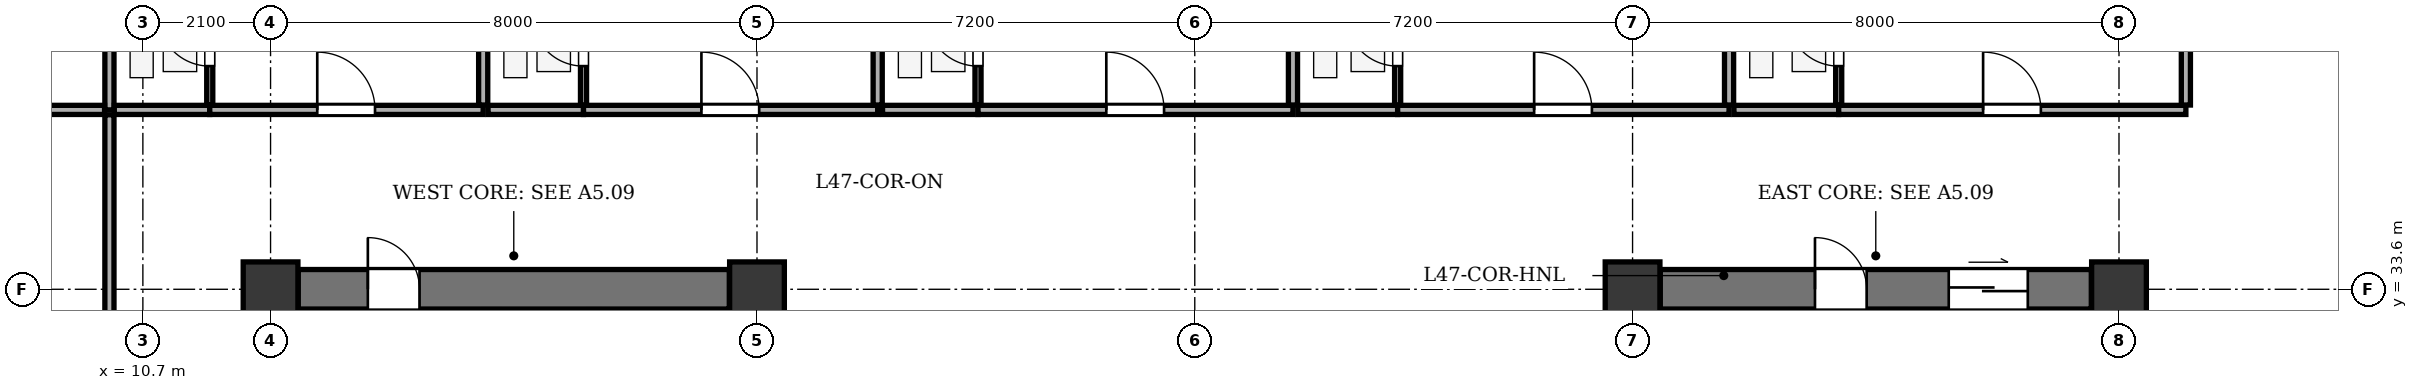
"""IFC4 building model, lengths in metres.
Left out: names, types, materials, properties, quantities, classifications, styles, units other than length and angle.
Written with IfcOpenShell. Run it as: python <this file> out.ifc"""

import sys

from ifc_helpers import new_model, si_unit, direction, frame, frame_2d, origin, origin_2d, place, context, subcontext, project, spatial, rectangle, extrude, element, fill, save


model = new_model("IFC4")
c1 = context("Model", 3, precision=1e-05, world=origin(), true_north=direction((0.0, 1.0)))
c2 = subcontext(c1, "Body", "Model", "MODEL_VIEW")
j1 = project(units=[si_unit("LENGTHUNIT", "METRE"), si_unit("PLANEANGLEUNIT", "RADIAN")], contexts=[c1])
p1 = place(None, origin())
s1 = spatial("IfcSite", under=j1, at=p1, CompositionType="ELEMENT")
p2 = place(p1, origin())
s2 = spatial("IfcBuilding", under=s1, at=p2, CompositionType="ELEMENT")
p3 = place(p2, frame((0.0, 0.0, 183.3)))
s3 = spatial("IfcBuildingStorey", under=s2, at=p3, CompositionType="ELEMENT", Elevation=183.3)
for number, where, z_axis, x_axis in (
    (1, (12.8, 33.6, 0.0), (0.0, 0.0, 1.0), (1.0, 0.0, 0.0)),
    (2, (20.8, 33.6, 0.0), (0.0, 0.0, 1.0), (1.0, 0.0, 0.0)),
    (3, (35.2, 33.6, 0.0), (0.0, 0.0, 1.0), (1.0, 0.0, 0.0)),
    (4, (43.2, 33.6, 0.0), (0.0, 0.0, 1.0), (1.0, 0.0, 0.0)),
):
    element("IfcColumn", number, at=place(p3, frame(where, z_axis=z_axis, x_axis=x_axis)), inside=s3, PredefinedType="COLUMN", context=c2, shape_type="SweptSolid", body=[
        extrude(rectangle(XDim=0.9, YDim=0.9, at=origin_2d()), origin(), (0.0, 0.0, 1.0), 3.5),
    ])
p4 = place(p3, frame((13.255, 33.6, 0.0), z_axis=(0.0, 0.0, 1.0), x_axis=(1.0, 0.0, 0.0)))
e5 = element("IfcWall", 5, at=p4, inside=s3, PredefinedType="SHEAR", context=c2, shape_type="SweptSolid", body=[
    extrude(rectangle(XDim=7.09, YDim=0.65, at=frame_2d((3.545, 0.0))), origin(), (0.0, 0.0, 1.0), 3.2),
])
p5 = place(p4, frame((1.145, 0.0, 0.0)))
e6 = element("IfcOpeningElement", 6, at=p5, cuts=e5, PredefinedType="OPENING", context=c2, shape_type="SweptSolid", body=[
    extrude(rectangle(XDim=0.85, YDim=2.02, at=frame_2d((0.425, 1.01))), frame((0.0, 0.335, 0.0), z_axis=(0.0, -1.0, 0.0), x_axis=(1.0, 0.0, 0.0)), (0.0, 0.0, 1.0), 0.67),
])
p6 = place(p3, frame((16.435, 21.135, 0.0), z_axis=(0.0, 0.0, 1.0), x_axis=(0.0, 1.0, 0.0)))
e7 = element("IfcWall", 7, at=p6, inside=s3, PredefinedType="SHEAR", context=c2, shape_type="SweptSolid", body=[
    extrude(rectangle(XDim=12.13, YDim=0.25, at=frame_2d((6.065, 0.0))), origin(), (0.0, 0.0, 1.0), 3.2),
])
p7 = place(p6, frame((0.515, 0.0, 0.0)))
e8 = element("IfcOpeningElement", 8, at=p7, cuts=e7, PredefinedType="OPENING", context=c2, shape_type="SweptSolid", body=[
    extrude(rectangle(XDim=1.2, YDim=2.15, at=frame_2d((0.6, 1.075))), frame((0.0, 0.135, 0.0), z_axis=(0.0, -1.0, 0.0), x_axis=(1.0, 0.0, 0.0)), (0.0, 0.0, 1.0), 0.27),
])
p8 = place(p6, frame((2.665, 0.0, 0.0)))
e9 = element("IfcOpeningElement", 9, at=p8, cuts=e7, PredefinedType="OPENING", context=c2, shape_type="SweptSolid", body=[
    extrude(rectangle(XDim=1.15, YDim=2.15, at=frame_2d((0.575, 1.075))), frame((0.0, 0.135, 0.0), z_axis=(0.0, -1.0, 0.0), x_axis=(1.0, 0.0, 0.0)), (0.0, 0.0, 1.0), 0.27),
])
p9 = place(p3, frame((18.12, 31.17, 0.0), z_axis=(0.0, 0.0, 1.0), x_axis=(0.0, 1.0, 0.0)))
e10 = element("IfcWall", 10, at=p9, inside=s3, PredefinedType="PARTITIONING", context=c2, shape_type="SweptSolid", body=[
    extrude(rectangle(XDim=2.095, YDim=0.18, at=frame_2d((1.047, 0.0))), origin(), (0.0, 0.0, 1.0), 3.2),
])
p10 = place(p3, frame((35.655, 33.6, 0.0), z_axis=(0.0, 0.0, 1.0), x_axis=(1.0, 0.0, 0.0)))
e11 = element("IfcWall", 11, at=p10, inside=s3, PredefinedType="SHEAR", context=c2, shape_type="SweptSolid", body=[
    extrude(rectangle(XDim=7.09, YDim=0.65, at=frame_2d((3.545, 0.0))), origin(), (0.0, 0.0, 1.0), 3.2),
])
p11 = place(p10, frame((4.745, 0.0, 0.0)))
e12 = element("IfcOpeningElement", 12, at=p11, cuts=e11, PredefinedType="OPENING", context=c2, shape_type="SweptSolid", body=[
    extrude(rectangle(XDim=1.3, YDim=2.15, at=frame_2d((0.65, 1.075))), frame((0.0, 0.335, 0.0), z_axis=(0.0, -1.0, 0.0), x_axis=(1.0, 0.0, 0.0)), (0.0, 0.0, 1.0), 0.67),
])
p12 = place(p10, frame((2.545, 0.0, 0.0)))
e13 = element("IfcOpeningElement", 13, at=p12, cuts=e11, PredefinedType="OPENING", context=c2, shape_type="SweptSolid", body=[
    extrude(rectangle(XDim=0.85, YDim=2.02, at=frame_2d((0.425, 1.01))), frame((0.0, 0.335, 0.0), z_axis=(0.0, -1.0, 0.0), x_axis=(1.0, 0.0, 0.0)), (0.0, 0.0, 1.0), 0.67),
])
p13 = place(p3, frame((39.565, 21.135, 0.0), z_axis=(0.0, 0.0, 1.0), x_axis=(0.0, 1.0, 0.0)))
e14 = element("IfcWall", 14, at=p13, inside=s3, PredefinedType="SHEAR", context=c2, shape_type="SweptSolid", body=[
    extrude(rectangle(XDim=12.13, YDim=0.25, at=frame_2d((6.065, 0.0))), origin(), (0.0, 0.0, 1.0), 3.2),
])
p14 = place(p13, frame((0.515, 0.0, 0.0)))
e15 = element("IfcOpeningElement", 15, at=p14, cuts=e14, PredefinedType="OPENING", context=c2, shape_type="SweptSolid", body=[
    extrude(rectangle(XDim=1.2, YDim=2.15, at=frame_2d((0.6, 1.075))), frame((0.0, 0.135, 0.0), z_axis=(0.0, -1.0, 0.0), x_axis=(1.0, 0.0, 0.0)), (0.0, 0.0, 1.0), 0.27),
])
p15 = place(p13, frame((2.665, 0.0, 0.0)))
e16 = element("IfcOpeningElement", 16, at=p15, cuts=e14, PredefinedType="OPENING", context=c2, shape_type="SweptSolid", body=[
    extrude(rectangle(XDim=1.15, YDim=2.15, at=frame_2d((0.575, 1.075))), frame((0.0, 0.135, 0.0), z_axis=(0.0, -1.0, 0.0), x_axis=(1.0, 0.0, 0.0)), (0.0, 0.0, 1.0), 0.27),
])
p16 = place(p3, frame((37.9, 25.27, 0.0), z_axis=(0.0, 0.0, 1.0), x_axis=(0.0, 1.0, 0.0)))
e17 = element("IfcWall", 17, at=p16, inside=s3, PredefinedType="SOLIDWALL", context=c2, shape_type="SweptSolid", body=[
    extrude(rectangle(XDim=7.995, YDim=0.2, at=frame_2d((3.998, 0.0))), origin(), (0.0, 0.0, 1.0), 3.2),
])
p17 = place(p3, frame((10.15, 36.55, 0.0), z_axis=(0.0, 0.0, 1.0), x_axis=(0.0, 1.0, 0.0)))
e18 = element("IfcWall", 18, at=p17, inside=s3, PredefinedType="PARTITIONING", context=c2, shape_type="SweptSolid", body=[
    extrude(rectangle(XDim=15.975, YDim=0.15, at=frame_2d((7.987, 0.0))), origin(), (0.0, 0.0, 1.0), 3.2),
])
p18 = place(p3, frame((10.23, 36.55, 0.0), z_axis=(0.0, 0.0, 1.0), x_axis=(1.0, 0.0, 0.0)))
e19 = element("IfcWall", 19, at=p18, inside=s3, PredefinedType="PARTITIONING", context=c2, shape_type="SweptSolid", body=[
    extrude(rectangle(XDim=1.57, YDim=0.15, at=frame_2d((0.785, 0.0))), origin(), (0.0, 0.0, 1.0), 3.2),
])
p19 = place(p3, frame((11.8, 36.55, 0.0), z_axis=(0.0, 0.0, 1.0), x_axis=(1.0, 0.0, 0.0)))
e20 = element("IfcWall", 20, at=p19, inside=s3, PredefinedType="PARTITIONING", context=c2, shape_type="SweptSolid", body=[
    extrude(rectangle(XDim=4.497, YDim=0.15, at=frame_2d((2.249, 0.0))), origin(), (0.0, 0.0, 1.0), 3.2),
])
p20 = place(p19, frame((1.768, 0.0, 0.0)))
e21 = element("IfcOpeningElement", 21, at=p20, cuts=e20, PredefinedType="OPENING", context=c2, shape_type="SweptSolid", body=[
    extrude(rectangle(XDim=0.95, YDim=2.1, at=frame_2d((0.475, 1.05))), frame((0.0, 0.085, 0.0), z_axis=(0.0, -1.0, 0.0), x_axis=(1.0, 0.0, 0.0)), (0.0, 0.0, 1.0), 0.17),
])
p21 = place(p3, frame((11.8, 36.63, 0.0), z_axis=(0.0, 0.0, 1.0), x_axis=(0.0, 1.0, 0.0)))
e22 = element("IfcWall", 22, at=p21, inside=s3, PredefinedType="PARTITIONING", context=c2, shape_type="SweptSolid", body=[
    extrude(rectangle(XDim=2.25, YDim=0.1, at=frame_2d((1.125, 0.0))), origin(), (0.0, 0.0, 1.0), 3.2),
])
p22 = place(p21, frame((0.64, 0.0, 0.0)))
e23 = element("IfcOpeningElement", 23, at=p22, cuts=e22, PredefinedType="OPENING", context=c2, shape_type="SweptSolid", body=[
    extrude(rectangle(XDim=0.85, YDim=2.05, at=frame_2d((0.425, 1.025))), frame((0.0, 0.06, 0.0), z_axis=(0.0, -1.0, 0.0), x_axis=(1.0, 0.0, 0.0)), (0.0, 0.0, 1.0), 0.12),
])
p23 = place(p3, frame((16.297, 36.63, 0.0), z_axis=(0.0, 0.0, 1.0), x_axis=(0.0, 1.0, 0.0)))
e24 = element("IfcWall", 24, at=p23, inside=s3, PredefinedType="PARTITIONING", context=c2, shape_type="SweptSolid", body=[
    extrude(rectangle(XDim=15.895, YDim=0.15, at=frame_2d((7.948, 0.0))), origin(), (0.0, 0.0, 1.0), 3.2),
])
p24 = place(p3, frame((16.377, 36.55, 0.0), z_axis=(0.0, 0.0, 1.0), x_axis=(1.0, 0.0, 0.0)))
e25 = element("IfcWall", 25, at=p24, inside=s3, PredefinedType="PARTITIONING", context=c2, shape_type="SweptSolid", body=[
    extrude(rectangle(XDim=1.57, YDim=0.15, at=frame_2d((0.785, 0.0))), origin(), (0.0, 0.0, 1.0), 3.2),
])
p25 = place(p3, frame((17.947, 36.55, 0.0), z_axis=(0.0, 0.0, 1.0), x_axis=(1.0, 0.0, 0.0)))
e26 = element("IfcWall", 26, at=p25, inside=s3, PredefinedType="PARTITIONING", context=c2, shape_type="SweptSolid", body=[
    extrude(rectangle(XDim=4.838, YDim=0.15, at=frame_2d((2.419, 0.0))), origin(), (0.0, 0.0, 1.0), 3.2),
])
p26 = place(p25, frame((1.939, 0.0, 0.0)))
e27 = element("IfcOpeningElement", 27, at=p26, cuts=e26, PredefinedType="OPENING", context=c2, shape_type="SweptSolid", body=[
    extrude(rectangle(XDim=0.95, YDim=2.1, at=frame_2d((0.475, 1.05))), frame((0.0, 0.085, 0.0), z_axis=(0.0, -1.0, 0.0), x_axis=(1.0, 0.0, 0.0)), (0.0, 0.0, 1.0), 0.17),
])
p27 = place(p3, frame((17.947, 36.63, 0.0), z_axis=(0.0, 0.0, 1.0), x_axis=(0.0, 1.0, 0.0)))
e28 = element("IfcWall", 28, at=p27, inside=s3, PredefinedType="PARTITIONING", context=c2, shape_type="SweptSolid", body=[
    extrude(rectangle(XDim=2.25, YDim=0.1, at=frame_2d((1.125, 0.0))), origin(), (0.0, 0.0, 1.0), 3.2),
])
p28 = place(p27, frame((0.64, 0.0, 0.0)))
e29 = element("IfcOpeningElement", 29, at=p28, cuts=e28, PredefinedType="OPENING", context=c2, shape_type="SweptSolid", body=[
    extrude(rectangle(XDim=0.85, YDim=2.05, at=frame_2d((0.425, 1.025))), frame((0.0, 0.06, 0.0), z_axis=(0.0, -1.0, 0.0), x_axis=(1.0, 0.0, 0.0)), (0.0, 0.0, 1.0), 0.12),
])
p29 = place(p3, frame((22.785, 36.63, 0.0), z_axis=(0.0, 0.0, 1.0), x_axis=(0.0, 1.0, 0.0)))
e30 = element("IfcWall", 30, at=p29, inside=s3, PredefinedType="PARTITIONING", context=c2, shape_type="SweptSolid", body=[
    extrude(rectangle(XDim=15.895, YDim=0.15, at=frame_2d((7.948, 0.0))), origin(), (0.0, 0.0, 1.0), 3.2),
])
p30 = place(p3, frame((22.865, 36.55, 0.0), z_axis=(0.0, 0.0, 1.0), x_axis=(1.0, 0.0, 0.0)))
e31 = element("IfcWall", 31, at=p30, inside=s3, PredefinedType="PARTITIONING", context=c2, shape_type="SweptSolid", body=[
    extrude(rectangle(XDim=1.57, YDim=0.15, at=frame_2d((0.785, 0.0))), origin(), (0.0, 0.0, 1.0), 3.2),
])
p31 = place(p3, frame((24.435, 36.55, 0.0), z_axis=(0.0, 0.0, 1.0), x_axis=(1.0, 0.0, 0.0)))
e32 = element("IfcWall", 32, at=p31, inside=s3, PredefinedType="PARTITIONING", context=c2, shape_type="SweptSolid", body=[
    extrude(rectangle(XDim=5.18, YDim=0.15, at=frame_2d((2.59, 0.0))), origin(), (0.0, 0.0, 1.0), 3.2),
])
p32 = place(p31, frame((2.11, 0.0, 0.0)))
e33 = element("IfcOpeningElement", 33, at=p32, cuts=e32, PredefinedType="OPENING", context=c2, shape_type="SweptSolid", body=[
    extrude(rectangle(XDim=0.95, YDim=2.1, at=frame_2d((0.475, 1.05))), frame((0.0, 0.085, 0.0), z_axis=(0.0, -1.0, 0.0), x_axis=(1.0, 0.0, 0.0)), (0.0, 0.0, 1.0), 0.17),
])
p33 = place(p3, frame((24.435, 36.63, 0.0), z_axis=(0.0, 0.0, 1.0), x_axis=(0.0, 1.0, 0.0)))
e34 = element("IfcWall", 34, at=p33, inside=s3, PredefinedType="PARTITIONING", context=c2, shape_type="SweptSolid", body=[
    extrude(rectangle(XDim=2.25, YDim=0.1, at=frame_2d((1.125, 0.0))), origin(), (0.0, 0.0, 1.0), 3.2),
])
p34 = place(p33, frame((0.64, 0.0, 0.0)))
e35 = element("IfcOpeningElement", 35, at=p34, cuts=e34, PredefinedType="OPENING", context=c2, shape_type="SweptSolid", body=[
    extrude(rectangle(XDim=0.85, YDim=2.05, at=frame_2d((0.425, 1.025))), frame((0.0, 0.06, 0.0), z_axis=(0.0, -1.0, 0.0), x_axis=(1.0, 0.0, 0.0)), (0.0, 0.0, 1.0), 0.12),
])
p35 = place(p3, frame((29.615, 36.63, 0.0), z_axis=(0.0, 0.0, 1.0), x_axis=(0.0, 1.0, 0.0)))
e36 = element("IfcWall", 36, at=p35, inside=s3, PredefinedType="PARTITIONING", context=c2, shape_type="SweptSolid", body=[
    extrude(rectangle(XDim=15.895, YDim=0.15, at=frame_2d((7.948, 0.0))), origin(), (0.0, 0.0, 1.0), 2.785),
])
p36 = place(p3, frame((29.695, 36.55, 0.0), z_axis=(0.0, 0.0, 1.0), x_axis=(1.0, 0.0, 0.0)))
e37 = element("IfcWall", 37, at=p36, inside=s3, PredefinedType="PARTITIONING", context=c2, shape_type="SweptSolid", body=[
    extrude(rectangle(XDim=1.641, YDim=0.15, at=frame_2d((0.821, 0.0))), origin(), (0.0, 0.0, 1.0), 3.2),
])
p37 = place(p3, frame((31.336, 36.55, 0.0), z_axis=(0.0, 0.0, 1.0), x_axis=(1.0, 0.0, 0.0)))
e38 = element("IfcWall", 38, at=p37, inside=s3, PredefinedType="PARTITIONING", context=c2, shape_type="SweptSolid", body=[
    extrude(rectangle(XDim=5.451, YDim=0.15, at=frame_2d((2.726, 0.0))), origin(), (0.0, 0.0, 1.0), 3.2),
])
p38 = place(p37, frame((2.245, 0.0, 0.0)))
e39 = element("IfcOpeningElement", 39, at=p38, cuts=e38, PredefinedType="OPENING", context=c2, shape_type="SweptSolid", body=[
    extrude(rectangle(XDim=0.95, YDim=2.1, at=frame_2d((0.475, 1.05))), frame((0.0, 0.085, 0.0), z_axis=(0.0, -1.0, 0.0), x_axis=(1.0, 0.0, 0.0)), (0.0, 0.0, 1.0), 0.17),
])
p39 = place(p3, frame((31.336, 36.63, 0.0), z_axis=(0.0, 0.0, 1.0), x_axis=(0.0, 1.0, 0.0)))
e40 = element("IfcWall", 40, at=p39, inside=s3, PredefinedType="PARTITIONING", context=c2, shape_type="SweptSolid", body=[
    extrude(rectangle(XDim=2.25, YDim=0.1, at=frame_2d((1.125, 0.0))), origin(), (0.0, 0.0, 1.0), 3.2),
])
p40 = place(p39, frame((0.64, 0.0, 0.0)))
e41 = element("IfcOpeningElement", 41, at=p40, cuts=e40, PredefinedType="OPENING", context=c2, shape_type="SweptSolid", body=[
    extrude(rectangle(XDim=0.85, YDim=2.05, at=frame_2d((0.425, 1.025))), frame((0.0, 0.06, 0.0), z_axis=(0.0, -1.0, 0.0), x_axis=(1.0, 0.0, 0.0)), (0.0, 0.0, 1.0), 0.12),
])
p41 = place(p3, frame((36.787, 36.63, 0.0), z_axis=(0.0, 0.0, 1.0), x_axis=(0.0, 1.0, 0.0)))
e42 = element("IfcWall", 42, at=p41, inside=s3, PredefinedType="PARTITIONING", context=c2, shape_type="SweptSolid", body=[
    extrude(rectangle(XDim=15.895, YDim=0.15, at=frame_2d((7.948, 0.0))), origin(), (0.0, 0.0, 1.0), 3.2),
])
p42 = place(p3, frame((36.867, 36.55, 0.0), z_axis=(0.0, 0.0, 1.0), x_axis=(1.0, 0.0, 0.0)))
e43 = element("IfcWall", 43, at=p42, inside=s3, PredefinedType="PARTITIONING", context=c2, shape_type="SweptSolid", body=[
    extrude(rectangle(XDim=1.723, YDim=0.15, at=frame_2d((0.862, 0.0))), origin(), (0.0, 0.0, 1.0), 3.2),
])
p43 = place(p3, frame((38.59, 36.55, 0.0), z_axis=(0.0, 0.0, 1.0), x_axis=(1.0, 0.0, 0.0)))
e44 = element("IfcWall", 44, at=p43, inside=s3, PredefinedType="PARTITIONING", context=c2, shape_type="SweptSolid", body=[
    extrude(rectangle(XDim=5.71, YDim=0.15, at=frame_2d((2.855, 0.0))), origin(), (0.0, 0.0, 1.0), 3.2),
])
p44 = place(p43, frame((2.375, 0.0, 0.0)))
e45 = element("IfcOpeningElement", 45, at=p44, cuts=e44, PredefinedType="OPENING", context=c2, shape_type="SweptSolid", body=[
    extrude(rectangle(XDim=0.95, YDim=2.1, at=frame_2d((0.475, 1.05))), frame((0.0, 0.085, 0.0), z_axis=(0.0, -1.0, 0.0), x_axis=(1.0, 0.0, 0.0)), (0.0, 0.0, 1.0), 0.17),
])
p45 = place(p3, frame((38.59, 36.63, 0.0), z_axis=(0.0, 0.0, 1.0), x_axis=(0.0, 1.0, 0.0)))
e46 = element("IfcWall", 46, at=p45, inside=s3, PredefinedType="PARTITIONING", context=c2, shape_type="SweptSolid", body=[
    extrude(rectangle(XDim=2.25, YDim=0.1, at=frame_2d((1.125, 0.0))), origin(), (0.0, 0.0, 1.0), 3.2),
])
p46 = place(p45, frame((0.64, 0.0, 0.0)))
e47 = element("IfcOpeningElement", 47, at=p46, cuts=e46, PredefinedType="OPENING", context=c2, shape_type="SweptSolid", body=[
    extrude(rectangle(XDim=0.85, YDim=2.05, at=frame_2d((0.425, 1.025))), frame((0.0, 0.06, 0.0), z_axis=(0.0, -1.0, 0.0), x_axis=(1.0, 0.0, 0.0)), (0.0, 0.0, 1.0), 0.12),
])
p47 = place(p3, frame((44.3, 36.63, 0.0), z_axis=(0.0, 0.0, 1.0), x_axis=(0.0, 1.0, 0.0)))
e48 = element("IfcWall", 48, at=p47, inside=s3, PredefinedType="PARTITIONING", context=c2, shape_type="SweptSolid", body=[
    extrude(rectangle(XDim=15.895, YDim=0.15, at=frame_2d((7.948, 0.0))), origin(), (0.0, 0.0, 1.0), 3.2),
])
p48 = place(p3, frame((4.675, 36.55, 0.0), z_axis=(0.0, 0.0, 1.0), x_axis=(1.0, 0.0, 0.0)))
e49 = element("IfcWall", 49, at=p48, inside=s3, PredefinedType="PARTITIONING", context=c2, shape_type="SweptSolid", body=[
    extrude(rectangle(XDim=5.395, YDim=0.15, at=frame_2d((2.698, 0.0))), origin(), (0.0, 0.0, 1.0), 3.2),
])
p49 = place(p3, frame((10.15, 17.93, 0.0), z_axis=(0.0, 0.0, 1.0), x_axis=(0.0, 1.0, 0.0)))
e50 = element("IfcWall", 50, at=p49, inside=s3, PredefinedType="PARTITIONING", context=c2, shape_type="SweptSolid", body=[
    extrude(rectangle(XDim=18.54, YDim=0.15, at=frame_2d((9.27, 0.0))), origin(), (0.0, 0.0, 1.0), 3.2),
])
p50 = place(p49, frame((8.79, 0.0, 0.0)))
e51 = element("IfcOpeningElement", 51, at=p50, cuts=e50, PredefinedType="OPENING", context=c2, shape_type="SweptSolid", body=[
    extrude(rectangle(XDim=0.95, YDim=2.1, at=frame_2d((0.475, 1.05))), frame((0.0, 0.085, 0.0), z_axis=(0.0, -1.0, 0.0), x_axis=(1.0, 0.0, 0.0)), (0.0, 0.0, 1.0), 0.17),
])
p51 = place(p5, origin())
e52 = element("IfcDoor", 52, at=p51, inside=s3, OperationType="SINGLE_SWING_LEFT", PredefinedType="DOOR", context=c2, shape_type="SweptSolid", body=[
    extrude(rectangle(XDim=0.85, YDim=2.02, at=frame_2d((0.425, 1.01))), frame((0.0, 0.025, 0.0), z_axis=(0.0, -1.0, 0.0), x_axis=(1.0, 0.0, 0.0)), (0.0, 0.0, 1.0), 0.05),
])
fill(e6, e52)
p52 = place(p11, origin())
e53 = element("IfcDoor", 53, at=p52, inside=s3, OperationType="DOUBLE_DOOR_SLIDING", PredefinedType="DOOR", context=c2, shape_type="SweptSolid", body=[
    extrude(rectangle(XDim=1.3, YDim=2.15, at=frame_2d((0.65, 1.075))), frame((0.0, 0.025, 0.0), z_axis=(0.0, -1.0, 0.0), x_axis=(1.0, 0.0, 0.0)), (0.0, 0.0, 1.0), 0.05),
])
fill(e12, e53)
p53 = place(p12, origin())
e54 = element("IfcDoor", 54, at=p53, inside=s3, OperationType="SINGLE_SWING_LEFT", PredefinedType="DOOR", context=c2, shape_type="SweptSolid", body=[
    extrude(rectangle(XDim=0.85, YDim=2.02, at=frame_2d((0.425, 1.01))), frame((0.0, 0.025, 0.0), z_axis=(0.0, -1.0, 0.0), x_axis=(1.0, 0.0, 0.0)), (0.0, 0.0, 1.0), 0.05),
])
fill(e13, e54)
p54 = place(p22, origin())
e55 = element("IfcDoor", 55, at=p54, inside=s3, OperationType="SINGLE_SWING_RIGHT", PredefinedType="DOOR", context=c2, shape_type="SweptSolid", body=[
    extrude(rectangle(XDim=0.85, YDim=2.05, at=frame_2d((0.425, 1.025))), frame((0.0, 0.025, 0.0), z_axis=(0.0, -1.0, 0.0), x_axis=(1.0, 0.0, 0.0)), (0.0, 0.0, 1.0), 0.05),
])
fill(e23, e55)
p55 = place(p20, origin())
e56 = element("IfcDoor", 56, at=p55, inside=s3, OperationType="SINGLE_SWING_LEFT", PredefinedType="DOOR", context=c2, shape_type="SweptSolid", body=[
    extrude(rectangle(XDim=0.95, YDim=2.1, at=frame_2d((0.475, 1.05))), frame((0.0, 0.025, 0.0), z_axis=(0.0, -1.0, 0.0), x_axis=(1.0, 0.0, 0.0)), (0.0, 0.0, 1.0), 0.05),
])
fill(e21, e56)
p56 = place(p28, origin())
e57 = element("IfcDoor", 57, at=p56, inside=s3, OperationType="SINGLE_SWING_RIGHT", PredefinedType="DOOR", context=c2, shape_type="SweptSolid", body=[
    extrude(rectangle(XDim=0.85, YDim=2.05, at=frame_2d((0.425, 1.025))), frame((0.0, 0.025, 0.0), z_axis=(0.0, -1.0, 0.0), x_axis=(1.0, 0.0, 0.0)), (0.0, 0.0, 1.0), 0.05),
])
fill(e29, e57)
p57 = place(p26, origin())
e58 = element("IfcDoor", 58, at=p57, inside=s3, OperationType="SINGLE_SWING_LEFT", PredefinedType="DOOR", context=c2, shape_type="SweptSolid", body=[
    extrude(rectangle(XDim=0.95, YDim=2.1, at=frame_2d((0.475, 1.05))), frame((0.0, 0.025, 0.0), z_axis=(0.0, -1.0, 0.0), x_axis=(1.0, 0.0, 0.0)), (0.0, 0.0, 1.0), 0.05),
])
fill(e27, e58)
p58 = place(p34, origin())
e59 = element("IfcDoor", 59, at=p58, inside=s3, OperationType="SINGLE_SWING_RIGHT", PredefinedType="DOOR", context=c2, shape_type="SweptSolid", body=[
    extrude(rectangle(XDim=0.85, YDim=2.05, at=frame_2d((0.425, 1.025))), frame((0.0, 0.025, 0.0), z_axis=(0.0, -1.0, 0.0), x_axis=(1.0, 0.0, 0.0)), (0.0, 0.0, 1.0), 0.05),
])
fill(e35, e59)
p59 = place(p32, origin())
e60 = element("IfcDoor", 60, at=p59, inside=s3, OperationType="SINGLE_SWING_LEFT", PredefinedType="DOOR", context=c2, shape_type="SweptSolid", body=[
    extrude(rectangle(XDim=0.95, YDim=2.1, at=frame_2d((0.475, 1.05))), frame((0.0, 0.025, 0.0), z_axis=(0.0, -1.0, 0.0), x_axis=(1.0, 0.0, 0.0)), (0.0, 0.0, 1.0), 0.05),
])
fill(e33, e60)
p60 = place(p40, origin())
e61 = element("IfcDoor", 61, at=p60, inside=s3, OperationType="SINGLE_SWING_RIGHT", PredefinedType="DOOR", context=c2, shape_type="SweptSolid", body=[
    extrude(rectangle(XDim=0.85, YDim=2.05, at=frame_2d((0.425, 1.025))), frame((0.0, 0.025, 0.0), z_axis=(0.0, -1.0, 0.0), x_axis=(1.0, 0.0, 0.0)), (0.0, 0.0, 1.0), 0.05),
])
fill(e41, e61)
p61 = place(p38, origin())
e62 = element("IfcDoor", 62, at=p61, inside=s3, OperationType="SINGLE_SWING_LEFT", PredefinedType="DOOR", context=c2, shape_type="SweptSolid", body=[
    extrude(rectangle(XDim=0.95, YDim=2.1, at=frame_2d((0.475, 1.05))), frame((0.0, 0.025, 0.0), z_axis=(0.0, -1.0, 0.0), x_axis=(1.0, 0.0, 0.0)), (0.0, 0.0, 1.0), 0.05),
])
fill(e39, e62)
p62 = place(p46, origin())
e63 = element("IfcDoor", 63, at=p62, inside=s3, OperationType="SINGLE_SWING_RIGHT", PredefinedType="DOOR", context=c2, shape_type="SweptSolid", body=[
    extrude(rectangle(XDim=0.85, YDim=2.05, at=frame_2d((0.425, 1.025))), frame((0.0, 0.025, 0.0), z_axis=(0.0, -1.0, 0.0), x_axis=(1.0, 0.0, 0.0)), (0.0, 0.0, 1.0), 0.05),
])
fill(e47, e63)
p63 = place(p44, origin())
e64 = element("IfcDoor", 64, at=p63, inside=s3, OperationType="SINGLE_SWING_LEFT", PredefinedType="DOOR", context=c2, shape_type="SweptSolid", body=[
    extrude(rectangle(XDim=0.95, YDim=2.1, at=frame_2d((0.475, 1.05))), frame((0.0, 0.025, 0.0), z_axis=(0.0, -1.0, 0.0), x_axis=(1.0, 0.0, 0.0)), (0.0, 0.0, 1.0), 0.05),
])
fill(e45, e64)
save(model, sys.argv[1])
